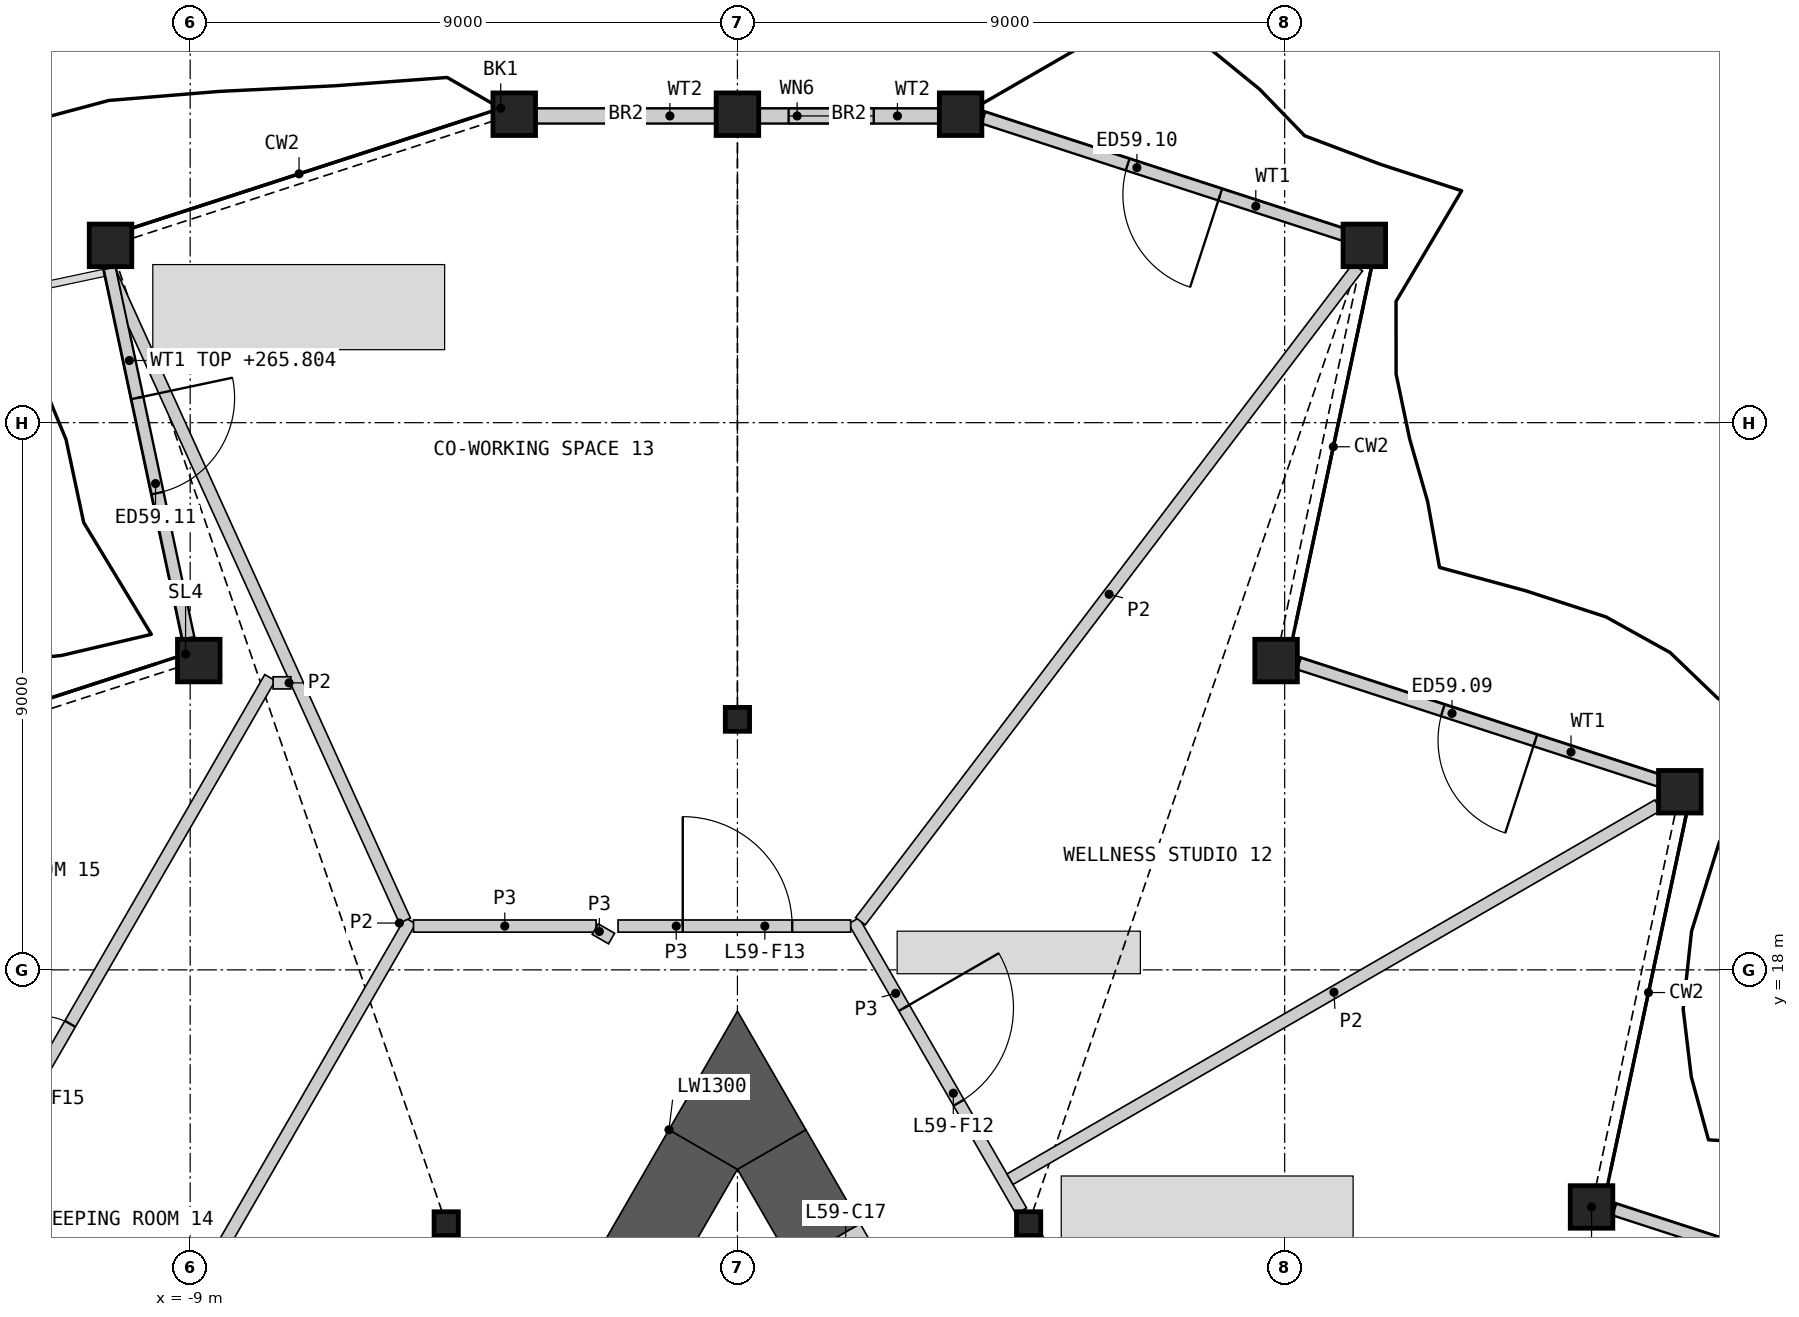
"""IFC4 building model, lengths in metres.
Left out: names, types, materials, properties, quantities, classifications, styles, units other than length and angle.
Written with IfcOpenShell. Run it as: python <this file> out.ifc"""

import sys

from ifc_helpers import new_model, si_unit, direction, frame, frame_2d, origin, origin_2d, place, context, subcontext, project, spatial, polyline, rectangle, hollow_rectangle, i_section, outline, extrude, element, fill, save


model = new_model("IFC4")
c1 = context("Model", 3, precision=1e-05, world=origin(), true_north=direction((0.0, 1.0)))
c2 = subcontext(c1, "Body", "Model", "MODEL_VIEW")
j1 = project(units=[si_unit("LENGTHUNIT", "METRE"), si_unit("PLANEANGLEUNIT", "RADIAN")], contexts=[c1])
p1 = place(None, origin())
s1 = spatial("IfcSite", under=j1, at=p1, CompositionType="ELEMENT")
p2 = place(p1, origin())
s2 = spatial("IfcBuilding", under=s1, at=p2, CompositionType="ELEMENT")
p3 = place(p2, frame((0.0, 0.0, 263.4)))
s3 = spatial("IfcBuildingStorey", under=s2, at=p3, CompositionType="ELEMENT", Elevation=263.4)
for number, where, z_axis, x_axis in (
    (1, (14.047, 14.101, 0.0), (0.0, 0.0, 1.0), (1.0, 0.0, 0.0)),
    (2, (15.499, 20.93, 0.0), (0.0, 0.0, 1.0), (1.0, 0.0, 0.0)),
    (3, (8.859, 23.087, 0.0), (0.0, 0.0, 1.0), (1.0, 0.0, 0.0)),
    (4, (10.31, 29.916, 0.0), (0.0, 0.0, 1.0), (1.0, 0.0, 0.0)),
    (5, (3.67, 32.073, 0.0), (0.0, 0.0, 1.0), (1.0, 0.0, 0.0)),
    (6, (0.0, 32.073, 0.0), (0.0, 0.0, 1.0), (1.0, 0.0, 0.0)),
    (7, (-3.67, 32.073, 0.0), (0.0, 0.0, 1.0), (1.0, 0.0, 0.0)),
    (8, (-10.31, 29.916, 0.0), (0.0, 0.0, 1.0), (1.0, 0.0, 0.0)),
    (9, (-8.859, 23.087, 0.0), (0.0, 0.0, 1.0), (1.0, 0.0, 0.0)),
):
    element("IfcColumn", number, at=place(p3, frame(where, z_axis=z_axis, x_axis=x_axis)), inside=s3, PredefinedType="COLUMN", context=c2, shape_type="SweptSolid", body=[
        extrude(hollow_rectangle(XDim=0.7, YDim=0.7, WallThickness=0.045, at=origin_2d()), origin(), (0.0, 0.0, 1.0), 3.6),
    ])
for number, where, z_axis, x_axis in (
    (10, (0.0, 22.121, 0.0), (0.0, 0.0, 1.0), (1.0, 0.0, 0.0)),
    (11, (-4.789, 13.825, 0.0), (0.0, 0.0, 1.0), (1.0, 0.0, 0.0)),
    (12, (4.789, 13.825, 0.0), (0.0, 0.0, 1.0), (1.0, 0.0, 0.0)),
):
    element("IfcColumn", number, at=place(p3, frame(where, z_axis=z_axis, x_axis=x_axis)), inside=s3, PredefinedType="COLUMN", context=c2, shape_type="SweptSolid", body=[
        extrude(i_section(OverallWidth=0.399, OverallDepth=0.393, WebThickness=0.023, FlangeThickness=0.037, at=origin_2d()), origin(), (0.0, 0.0, 1.0), 3.6),
    ])
p4 = place(p3, frame((20.384, 12.121, 0.0), z_axis=(0.0, 0.0, 1.0), x_axis=(-0.951051239427, 0.309033234433, 0.0)))
e13 = element("IfcWall", 13, at=p4, inside=s3, PredefinedType="SOLIDWALL", context=c2, shape_type="SweptSolid", body=[
    extrude(rectangle(XDim=6.269, YDim=0.2, at=frame_2d((3.134, 0.0))), origin(), (0.0, 0.0, 1.0), 2.701),
])
p5 = place(p4, frame((2.186, 0.0, 0.0)))
e14 = element("IfcOpeningElement", 14, at=p5, cuts=e13, PredefinedType="OPENING", context=c2, shape_type="SweptSolid", body=[
    extrude(rectangle(XDim=1.6, YDim=2.4, at=frame_2d((0.8, 1.2))), frame((0.0, 0.11, 0.0), z_axis=(0.0, -1.0, 0.0), x_axis=(1.0, 0.0, 0.0)), (0.0, 0.0, 1.0), 0.22),
])
p6 = place(p3, frame((15.201, 21.098, 0.0), z_axis=(0.0, 0.0, 1.0), x_axis=(-0.95105665506, 0.309016567299, 0.0)))
e15 = element("IfcWall", 15, at=p6, inside=s3, PredefinedType="SOLIDWALL", context=c2, shape_type="SweptSolid", body=[
    extrude(rectangle(XDim=6.275, YDim=0.2, at=frame_2d((3.137, 0.0))), origin(), (0.0, 0.0, 1.0), 2.701),
])
p7 = place(p6, frame((2.186, 0.0, 0.0)))
e16 = element("IfcOpeningElement", 16, at=p7, cuts=e15, PredefinedType="OPENING", context=c2, shape_type="SweptSolid", body=[
    extrude(rectangle(XDim=1.6, YDim=2.4, at=frame_2d((0.8, 1.2))), frame((0.0, 0.11, 0.0), z_axis=(0.0, -1.0, 0.0), x_axis=(1.0, 0.0, 0.0)), (0.0, 0.0, 1.0), 0.22),
])
p8 = place(p3, frame((10.018, 30.074, 0.0), z_axis=(0.0, 0.0, 1.0), x_axis=(-0.951062060282, 0.308999931218, 0.0)))
e17 = element("IfcWall", 17, at=p8, inside=s3, PredefinedType="SOLIDWALL", context=c2, shape_type="SweptSolid", body=[
    extrude(rectangle(XDim=6.281, YDim=0.2, at=frame_2d((3.14, 0.0))), origin(), (0.0, 0.0, 1.0), 2.701),
])
p9 = place(p8, frame((2.186, 0.0, 0.0)))
e18 = element("IfcOpeningElement", 18, at=p9, cuts=e17, PredefinedType="OPENING", context=c2, shape_type="SweptSolid", body=[
    extrude(rectangle(XDim=1.6, YDim=2.4, at=frame_2d((0.8, 1.2))), frame((0.0, 0.11, 0.0), z_axis=(0.0, -1.0, 0.0), x_axis=(1.0, 0.0, 0.0)), (0.0, 0.0, 1.0), 0.22),
])
p10 = place(p3, frame((3.392, 32.045, 0.0), z_axis=(0.0, 0.0, 1.0), x_axis=(-1.0, 0.0, 0.0)))
e19 = element("IfcWall", 19, at=p10, inside=s3, PredefinedType="SOLIDWALL", context=c2, shape_type="SweptSolid", body=[
    extrude(rectangle(XDim=3.042, YDim=0.25, at=frame_2d((1.521, 0.0))), origin(), (0.0, 0.0, 1.0), 2.701),
])
p11 = place(p10, frame((1.15, 0.0, 1.9)))
e20 = element("IfcOpeningElement", 20, at=p11, cuts=e19, PredefinedType="OPENING", context=c2, shape_type="SweptSolid", body=[
    extrude(rectangle(XDim=1.4, YDim=0.6, at=frame_2d((0.7, 0.3))), frame((0.0, 0.135, 0.0), z_axis=(0.0, -1.0, 0.0), x_axis=(1.0, 0.0, 0.0)), (0.0, 0.0, 1.0), 0.27),
])
p12 = place(p3, frame((-0.35, 32.045, 0.0), z_axis=(0.0, 0.0, 1.0), x_axis=(-1.0, 0.0, 0.0)))
e21 = element("IfcWall", 21, at=p12, inside=s3, PredefinedType="SOLIDWALL", context=c2, shape_type="SweptSolid", body=[
    extrude(rectangle(XDim=3.042, YDim=0.25, at=frame_2d((1.521, 0.0))), origin(), (0.0, 0.0, 1.0), 2.701),
])
p13 = place(p3, frame((-10.324, 29.545, 0.0), z_axis=(0.0, 0.0, 1.0), x_axis=(0.207930490886, -0.978143604467, 0.0)))
e22 = element("IfcWall", 22, at=p13, inside=s3, PredefinedType="SOLIDWALL", context=c2, shape_type="SweptSolid", body=[
    extrude(rectangle(XDim=6.228, YDim=0.2, at=frame_2d((3.114, 0.0))), origin(), (0.0, 0.0, 1.0), 2.404),
])
p14 = place(p13, frame((2.186, 0.0, 0.0)))
e23 = element("IfcOpeningElement", 23, at=p14, cuts=e22, PredefinedType="OPENING", context=c2, shape_type="SweptSolid", body=[
    extrude(rectangle(XDim=1.6, YDim=2.4, at=frame_2d((0.8, 1.2))), frame((0.0, 0.11, 0.0), z_axis=(0.0, -1.0, 0.0), x_axis=(1.0, 0.0, 0.0)), (0.0, 0.0, 1.0), 0.22),
])
p15 = place(p3, frame((1.456, 13.499, 0.0), z_axis=(0.0, 0.0, 1.0), x_axis=(-0.499990639951, 0.866030807744, 0.0)))
e24 = element("IfcWall", 24, at=p15, inside=s3, PredefinedType="SHEAR", context=c2, shape_type="SweptSolid", body=[
    extrude(rectangle(XDim=1.786, YDim=1.3, at=frame_2d((0.893, 0.0))), origin(), (0.0, 0.0, 1.0), 3.25),
])
p16 = place(p3, frame((-0.563, 15.045, 0.0), z_axis=(0.0, 0.0, 1.0), x_axis=(-0.500011498138, -0.866018765229, 0.0)))
e25 = element("IfcWall", 25, at=p16, inside=s3, PredefinedType="SHEAR", context=c2, shape_type="SweptSolid", body=[
    extrude(rectangle(XDim=5.947, YDim=1.3, at=frame_2d((2.973, 0.0))), origin(), (0.0, 0.0, 1.0), 3.25),
])
p17 = place(p3, origin())
e26 = element("IfcWall", 26, at=p17, inside=s3, PredefinedType="SHEAR", context=c2, shape_type="SweptSolid", body=[
    extrude(outline(polyline([(-1.126, 15.371), (0.0, 17.321), (1.126, 15.371), (0.0, 14.72), (-1.126, 15.371)])), origin(), (0.0, 0.0, 1.0), 3.25),
])
p18 = place(p3, frame((2.556, 11.593, 0.0), z_axis=(0.0, 0.0, 1.0), x_axis=(-0.499946605688, 0.86605622881, 0.0)))
e27 = element("IfcWall", 27, at=p18, inside=s3, PredefinedType="SHEAR", context=c2, shape_type="SweptSolid", body=[
    extrude(rectangle(XDim=2.2, YDim=1.3, at=frame_2d((1.1, 0.0))), origin(), (0.0, 0.0, 1.0), 3.25),
])
p19 = place(p18, frame((0.65, 0.0, 0.0)))
e28 = element("IfcOpeningElement", 28, at=p19, cuts=e27, PredefinedType="OPENING", context=c2, shape_type="SweptSolid", body=[
    extrude(rectangle(XDim=1.0, YDim=2.1, at=frame_2d((0.5, 1.05))), frame((0.0, 0.66, 0.0), z_axis=(0.0, -1.0, 0.0), x_axis=(1.0, 0.0, 0.0)), (0.0, 0.0, 1.0), 1.32),
])
p20 = place(p3, frame((-18.976, -4.747, 0.0), z_axis=(0.0, 0.0, 1.0), x_axis=(0.499999852422, 0.866025488988, 0.0)))
e29 = element("IfcWall", 29, at=p20, inside=s3, PredefinedType="PARTITIONING", context=c2, shape_type="SweptSolid", body=[
    extrude(rectangle(XDim=27.198, YDim=0.2, at=frame_2d((13.599, 0.0))), origin(), (0.0, 0.0, 1.0), 3.25),
])
p21 = place(p20, frame((19.886, 0.0, 0.0)))
e30 = element("IfcOpeningElement", 30, at=p21, cuts=e29, PredefinedType="OPENING", context=c2, shape_type="SweptSolid", body=[
    extrude(rectangle(XDim=0.95, YDim=2.1, at=frame_2d((0.475, 1.05))), frame((0.0, 0.11, 0.0), z_axis=(0.0, -1.0, 0.0), x_axis=(1.0, 0.0, 0.0)), (0.0, 0.0, 1.0), 0.22),
])
p22 = place(p20, frame((11.895, 0.0, 0.0)))
e31 = element("IfcOpeningElement", 31, at=p22, cuts=e29, PredefinedType="OPENING", context=c2, shape_type="SweptSolid", body=[
    extrude(rectangle(XDim=1.1, YDim=2.1, at=frame_2d((0.55, 1.05))), frame((0.0, 0.11, 0.0), z_axis=(0.0, -1.0, 0.0), x_axis=(1.0, 0.0, 0.0)), (0.0, 0.0, 1.0), 0.22),
])
p23 = place(p20, frame((1.152, 0.0, 0.0)))
e32 = element("IfcOpeningElement", 32, at=p23, cuts=e29, PredefinedType="OPENING", context=c2, shape_type="SweptSolid", body=[
    extrude(rectangle(XDim=0.95, YDim=2.1, at=frame_2d((0.475, 1.05))), frame((0.0, 0.11, 0.0), z_axis=(0.0, -1.0, 0.0), x_axis=(1.0, 0.0, 0.0)), (0.0, 0.0, 1.0), 0.22),
])
p24 = place(p3, frame((4.91, 13.616, 0.0), z_axis=(0.0, 0.0, 1.0), x_axis=(0.50000207303, -0.866024206917, 0.0)))
e33 = element("IfcWall", 33, at=p24, inside=s3, PredefinedType="PARTITIONING", context=c2, shape_type="SweptSolid", body=[
    extrude(rectangle(XDim=9.095, YDim=0.2, at=frame_2d((4.547, 0.0))), origin(), (0.0, 0.0, 1.0), 3.25),
])
p25 = place(p24, frame((3.698, 0.0, 0.0)))
e34 = element("IfcOpeningElement", 34, at=p25, cuts=e33, PredefinedType="OPENING", context=c2, shape_type="SweptSolid", body=[
    extrude(rectangle(XDim=1.8, YDim=2.1, at=frame_2d((0.9, 1.05))), frame((0.0, 0.11, 0.0), z_axis=(0.0, -1.0, 0.0), x_axis=(1.0, 0.0, 0.0)), (0.0, 0.0, 1.0), 0.22),
])
p26 = place(p3, frame((1.913, 18.807, 0.0), z_axis=(0.0, 0.0, 1.0), x_axis=(0.499984524817, -0.866034338201, 0.0)))
e35 = element("IfcWall", 35, at=p26, inside=s3, PredefinedType="PARTITIONING", context=c2, shape_type="SweptSolid", body=[
    extrude(rectangle(XDim=5.51, YDim=0.2, at=frame_2d((2.755, 0.0))), origin(), (0.0, 0.0, 1.0), 3.25),
])
p27 = place(p26, frame((1.655, 0.0, 0.0)))
e36 = element("IfcOpeningElement", 36, at=p27, cuts=e35, PredefinedType="OPENING", context=c2, shape_type="SweptSolid", body=[
    extrude(rectangle(XDim=1.8, YDim=2.1, at=frame_2d((0.9, 1.05))), frame((0.0, 0.11, 0.0), z_axis=(0.0, -1.0, 0.0), x_axis=(1.0, 0.0, 0.0)), (0.0, 0.0, 1.0), 0.22),
])
p28 = place(p3, frame((-1.963, 18.72, 0.0), z_axis=(0.0, 0.0, 1.0), x_axis=(1.0, 0.0, 0.0)))
e37 = element("IfcWall", 37, at=p28, inside=s3, PredefinedType="PARTITIONING", context=c2, shape_type="SweptSolid", body=[
    extrude(rectangle(XDim=3.826, YDim=0.2, at=frame_2d((1.913, 0.0))), origin(), (0.0, 0.0, 1.0), 3.25),
])
p29 = place(p28, frame((1.064, 0.0, 0.0)))
e38 = element("IfcOpeningElement", 38, at=p29, cuts=e37, PredefinedType="OPENING", context=c2, shape_type="SweptSolid", body=[
    extrude(rectangle(XDim=1.8, YDim=2.1, at=frame_2d((0.9, 1.05))), frame((0.0, 0.11, 0.0), z_axis=(0.0, -1.0, 0.0), x_axis=(1.0, 0.0, 0.0)), (0.0, 0.0, 1.0), 0.22),
])
p30 = place(p3, frame((-5.327, 18.72, 0.0), z_axis=(0.0, 0.0, 1.0), x_axis=(1.0, 0.0, 0.0)))
e39 = element("IfcWall", 39, at=p30, inside=s3, PredefinedType="PARTITIONING", context=c2, shape_type="SweptSolid", body=[
    extrude(rectangle(XDim=3.002, YDim=0.2, at=frame_2d((1.501, 0.0))), origin(), (0.0, 0.0, 1.0), 3.25),
])
p31 = place(p3, frame((-2.338, 18.67, 0.0), z_axis=(0.0, 0.0, 1.0), x_axis=(0.866054481515, -0.499949632511, 0.0)))
e40 = element("IfcWall", 40, at=p31, inside=s3, PredefinedType="PARTITIONING", context=c2, shape_type="SweptSolid", body=[
    extrude(rectangle(XDim=0.31, YDim=0.2, at=frame_2d((0.155, 0.0))), origin(), (0.0, 0.0, 1.0), 3.25),
])
p32 = place(p3, frame((-15.591, 9.117, 0.0), z_axis=(0.0, 0.0, 1.0), x_axis=(0.499994281579, 0.866028705291, 0.0)))
e41 = element("IfcWall", 41, at=p32, inside=s3, PredefinedType="PARTITIONING", context=c2, shape_type="SweptSolid", body=[
    extrude(rectangle(XDim=15.808, YDim=0.2, at=frame_2d((7.904, 0.0))), origin(), (0.0, 0.0, 1.0), 2.404),
])
p33 = place(p32, frame((8.283, 0.0, 0.0)))
e42 = element("IfcOpeningElement", 42, at=p33, cuts=e41, PredefinedType="OPENING", context=c2, shape_type="SweptSolid", body=[
    extrude(rectangle(XDim=0.95, YDim=2.1, at=frame_2d((0.475, 1.05))), frame((0.0, 0.11, 0.0), z_axis=(0.0, -1.0, 0.0), x_axis=(1.0, 0.0, 0.0)), (0.0, 0.0, 1.0), 0.22),
])
p34 = place(p3, frame((2.024, 18.8, 0.0), z_axis=(0.0, 0.0, 1.0), x_axis=(0.605225740135, 0.796053894832, 0.0)))
e43 = element("IfcWall", 43, at=p34, inside=s3, PredefinedType="PARTITIONING", context=c2, shape_type="SweptSolid", body=[
    extrude(rectangle(XDim=13.511, YDim=0.2, at=frame_2d((6.756, 0.0))), origin(), (0.0, 0.0, 1.0), 2.404),
])
p35 = place(p3, frame((4.482, 14.557, 0.0), z_axis=(0.0, 0.0, 1.0), x_axis=(0.866030620616, 0.499990964073, 0.0)))
e44 = element("IfcWall", 44, at=p35, inside=s3, PredefinedType="PARTITIONING", context=c2, shape_type="SweptSolid", body=[
    extrude(rectangle(XDim=12.304, YDim=0.2, at=frame_2d((6.152, 0.0))), origin(), (0.0, 0.0, 1.0), 2.404),
])
p36 = place(p3, origin())
e45 = element("IfcWall", 45, at=p36, inside=s3, PredefinedType="PARTITIONING", context=c2, shape_type="SweptSolid", body=[
    extrude(outline(polyline([(-5.56, 18.77), (-10.017, 28.582), (-10.21, 29.491), (-5.377, 18.853), (-5.56, 18.77)])), origin(), (0.0, 0.0, 1.0), 2.404),
])
p37 = place(p3, frame((-7.636, 22.72, 0.0), z_axis=(0.0, 0.0, 1.0), x_axis=(1.0, 0.0, 0.0)))
e46 = element("IfcWall", 46, at=p37, inside=s3, PredefinedType="PARTITIONING", context=c2, shape_type="SweptSolid", body=[
    extrude(rectangle(XDim=0.292, YDim=0.2, at=frame_2d((0.146, 0.0))), origin(), (0.0, 0.0, 1.0), 2.404),
])
p38 = place(p7, origin())
e47 = element("IfcDoor", 47, at=p38, inside=s3, OperationType="DOUBLE_DOOR_SINGLE_SWING", PredefinedType="DOOR", context=c2, shape_type="SweptSolid", body=[
    extrude(rectangle(XDim=1.6, YDim=2.4, at=frame_2d((0.8, 1.2))), frame((0.0, 0.025, 0.0), z_axis=(0.0, -1.0, 0.0), x_axis=(1.0, 0.0, 0.0)), (0.0, 0.0, 1.0), 0.05),
])
fill(e16, e47)
p39 = place(p9, origin())
e48 = element("IfcDoor", 48, at=p39, inside=s3, OperationType="DOUBLE_DOOR_SINGLE_SWING", PredefinedType="DOOR", context=c2, shape_type="SweptSolid", body=[
    extrude(rectangle(XDim=1.6, YDim=2.4, at=frame_2d((0.8, 1.2))), frame((0.0, 0.025, 0.0), z_axis=(0.0, -1.0, 0.0), x_axis=(1.0, 0.0, 0.0)), (0.0, 0.0, 1.0), 0.05),
])
fill(e18, e48)
p40 = place(p11, origin())
e49 = element("IfcWindow", 49, at=p40, inside=s3, PartitioningType="SINGLE_PANEL", PredefinedType="WINDOW", context=c2, shape_type="SweptSolid", body=[
    extrude(rectangle(XDim=1.4, YDim=0.6, at=frame_2d((0.7, 0.3))), frame((0.0, 0.03, 0.0), z_axis=(0.0, -1.0, 0.0), x_axis=(1.0, 0.0, 0.0)), (0.0, 0.0, 1.0), 0.06),
])
fill(e20, e49)
p41 = place(p14, origin())
e50 = element("IfcDoor", 50, at=p41, inside=s3, OperationType="DOUBLE_DOOR_SINGLE_SWING", PredefinedType="DOOR", context=c2, shape_type="SweptSolid", body=[
    extrude(rectangle(XDim=1.6, YDim=2.4, at=frame_2d((0.8, 1.2))), frame((0.0, 0.025, 0.0), z_axis=(0.0, -1.0, 0.0), x_axis=(1.0, 0.0, 0.0)), (0.0, 0.0, 1.0), 0.05),
])
fill(e23, e50)
p42 = place(p27, origin())
e51 = element("IfcDoor", 51, at=p42, inside=s3, OperationType="DOUBLE_DOOR_SINGLE_SWING", PredefinedType="DOOR", context=c2, shape_type="SweptSolid", body=[
    extrude(rectangle(XDim=1.8, YDim=2.1, at=frame_2d((0.9, 1.05))), frame((0.0, 0.025, 0.0), z_axis=(0.0, -1.0, 0.0), x_axis=(1.0, 0.0, 0.0)), (0.0, 0.0, 1.0), 0.05),
])
fill(e36, e51)
p43 = place(p29, origin())
e52 = element("IfcDoor", 52, at=p43, inside=s3, OperationType="DOUBLE_DOOR_SINGLE_SWING", PredefinedType="DOOR", context=c2, shape_type="SweptSolid", body=[
    extrude(rectangle(XDim=1.8, YDim=2.1, at=frame_2d((0.9, 1.05))), frame((0.0, 0.025, 0.0), z_axis=(0.0, -1.0, 0.0), x_axis=(1.0, 0.0, 0.0)), (0.0, 0.0, 1.0), 0.05),
])
fill(e38, e52)
p44 = place(p33, origin())
e53 = element("IfcDoor", 53, at=p44, inside=s3, OperationType="SINGLE_SWING_LEFT", PredefinedType="DOOR", context=c2, shape_type="SweptSolid", body=[
    extrude(rectangle(XDim=0.95, YDim=2.1, at=frame_2d((0.475, 1.05))), frame((0.0, 0.025, 0.0), z_axis=(0.0, -1.0, 0.0), x_axis=(1.0, 0.0, 0.0)), (0.0, 0.0, 1.0), 0.05),
])
fill(e42, e53)
save(model, sys.argv[1])
